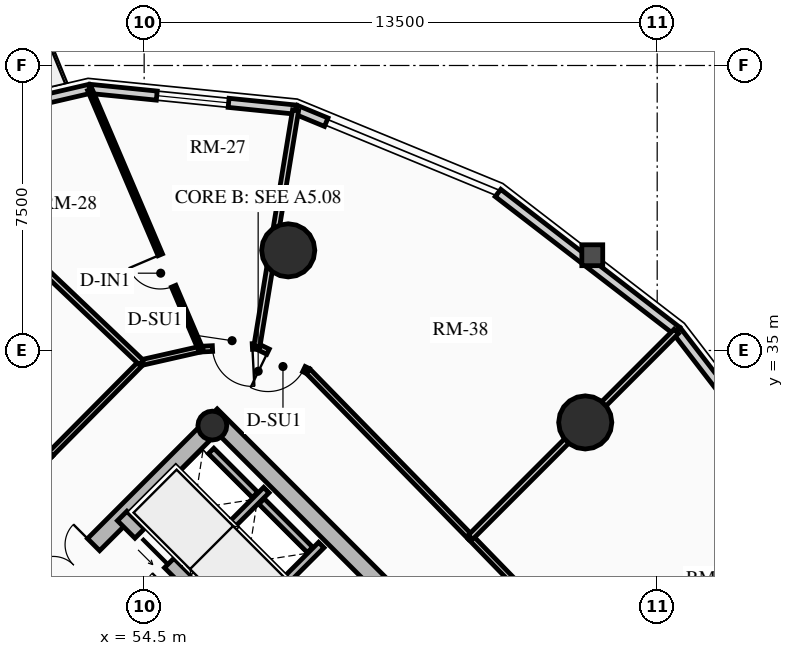
"""IFC4 building model, lengths in metres.
Left out: names, types, materials, properties, quantities, classifications, styles, units other than length and angle.
Written with IfcOpenShell. Run it as: python <this file> out.ifc"""

import sys

from ifc_helpers import new_model, si_unit, direction, frame, frame_2d, origin, origin_2d, place, context, subcontext, project, spatial, rectangle, circle, hollow_circle, extrude, source, transform, mapped, element, fill, save


model = new_model("IFC4")
c1 = context("Model", 3, precision=1e-05, world=origin(), true_north=direction((0.0, 1.0)))
c2 = subcontext(c1, "Body", "Model", "MODEL_VIEW")
j1 = project(units=[si_unit("LENGTHUNIT", "METRE"), si_unit("PLANEANGLEUNIT", "RADIAN")], contexts=[c1])
p1 = place(None, origin())
s1 = spatial("IfcSite", under=j1, at=p1, CompositionType="ELEMENT")
p2 = place(p1, origin())
s2 = spatial("IfcBuilding", under=s1, at=p2, CompositionType="ELEMENT")
p3 = place(p2, frame((0.0, 0.0, 78.88)))
s3 = spatial("IfcBuildingStorey", under=s2, at=p3, CompositionType="ELEMENT", Elevation=78.88)
p4 = place(p3, frame((66.303, 23.263, 0.0), z_axis=(0.0, 0.0, 1.0), x_axis=(-0.707106781187, 0.707106781187, 0.0)))
e1 = element("IfcWall", 1, at=p4, inside=s3, PredefinedType="SHEAR", context=c2, shape_type="SweptSolid", body=[
    extrude(rectangle(XDim=14.2, YDim=0.45, at=frame_2d((7.1, 0.0))), origin(), (0.0, 0.0, 1.0), 2.91),
])
p5 = place(p3, frame((48.856, 25.578, 0.0), z_axis=(0.0, 0.0, 1.0), x_axis=(0.707106781187, 0.707106781187, 0.0)))
e2 = element("IfcWall", 2, at=p5, inside=s3, PredefinedType="SHEAR", context=c2, shape_type="SweptSolid", body=[
    extrude(rectangle(XDim=10.7, YDim=0.45, at=frame_2d((5.35, 0.0))), origin(), (0.0, 0.0, 1.0), 2.91),
])
m1 = source(origin(), c2, "Body", "SweptSolid", [
    extrude(rectangle(XDim=1.5, YDim=2.02, at=frame_2d((0.75, 1.01))), frame((0.0, 0.235, 0.0), z_axis=(0.0, -1.0, 0.0), x_axis=(1.0, 0.0, 0.0)), (0.0, 0.0, 1.0), 0.47),
])
p6 = place(p5, frame((4.6, 0.0, 0.0)))
e3 = element("IfcOpeningElement", 3, at=p6, cuts=e2, PredefinedType="OPENING", context=c2, shape_type="MappedRepresentation", body=[
    mapped(m1, transform((0.0, 0.0, 0.0), x_axis=(1.0, 0.0, 0.0), y_axis=(0.0, 1.0, 0.0), z_axis=(0.0, 0.0, 1.0), scale=1.0)),
])
p7 = place(p3, frame((63.645, 20.922, 0.0), z_axis=(0.0, 0.0, 1.0), x_axis=(-0.707106781187, 0.707106781187, 0.0)))
e4 = element("IfcWall", 4, at=p7, inside=s3, PredefinedType="SHEAR", context=c2, shape_type="SweptSolid", body=[
    extrude(rectangle(XDim=13.75, YDim=0.35, at=frame_2d((6.875, 0.0))), origin(), (0.0, 0.0, 1.0), 2.91),
])
m2 = source(origin(), c2, "Body", "SweptSolid", [
    extrude(rectangle(XDim=1.1, YDim=2.015, at=frame_2d((0.55, 1.007))), frame((0.0, 0.185, 0.0), z_axis=(0.0, -1.0, 0.0), x_axis=(1.0, 0.0, 0.0)), (0.0, 0.0, 1.0), 0.37),
])
p8 = place(p7, frame((10.0, 0.0, 0.0)))
e5 = element("IfcOpeningElement", 5, at=p8, cuts=e4, PredefinedType="OPENING", context=c2, shape_type="MappedRepresentation", body=[
    mapped(m2, transform((0.0, 0.0, 0.0), x_axis=(1.0, 0.0, 0.0), y_axis=(0.0, 1.0, 0.0), z_axis=(0.0, 0.0, 1.0), scale=1.0)),
])
p9 = place(p7, frame((12.0, 0.0, 0.0)))
e6 = element("IfcOpeningElement", 6, at=p9, cuts=e4, PredefinedType="OPENING", context=c2, shape_type="MappedRepresentation", body=[
    mapped(m2, transform((0.0, 0.0, 0.0), x_axis=(1.0, 0.0, 0.0), y_axis=(0.0, 1.0, 0.0), z_axis=(0.0, 0.0, 1.0), scale=1.0)),
])
m3 = source(origin(), c2, "Body", "SweptSolid", [
    extrude(rectangle(XDim=1.15, YDim=2.02, at=frame_2d((0.575, 1.01))), frame((0.0, 0.185, 0.0), z_axis=(0.0, -1.0, 0.0), x_axis=(1.0, 0.0, 0.0)), (0.0, 0.0, 1.0), 0.37),
])
p10 = place(p7, frame((5.305, 0.0, 0.0)))
e7 = element("IfcOpeningElement", 7, at=p10, cuts=e4, PredefinedType="OPENING", context=c2, shape_type="MappedRepresentation", body=[
    mapped(m3, transform((0.0, 0.0, 0.0), x_axis=(1.0, 0.0, 0.0), y_axis=(0.0, 1.0, 0.0), z_axis=(0.0, 0.0, 1.0), scale=1.0)),
])
p11 = place(p3, frame((56.294, 33.024, 0.0), z_axis=(0.0, 0.0, 1.0), x_axis=(0.707106781187, 0.707106781187, 0.0)))
e8 = element("IfcColumn", 8, at=p11, inside=s3, PredefinedType="COLUMN", context=c2, shape_type="SweptSolid", body=[
    extrude(hollow_circle(Radius=0.38, WallThickness=0.032, at=origin_2d()), origin(), (0.0, 0.0, 1.0), 2.91),
])
for number, where, z_axis, x_axis in (
    (9, (66.107, 33.107, 0.0), (0.0, 0.0, 1.0), (1.0, 0.0, 0.0)),
    (10, (58.291, 37.635, 0.0), (0.0, 0.0, 1.0), (1.0, 0.0, 0.0)),
):
    element("IfcColumn", number, at=place(p3, frame(where, z_axis=z_axis, x_axis=x_axis)), inside=s3, PredefinedType="USERDEFINED", context=c2, shape_type="SweptSolid", body=[
        extrude(circle(Radius=0.7, at=origin_2d()), origin(), (0.0, 0.0, 1.0), 2.91),
    ])
p12 = place(p3, frame((63.811, 39.145, 0.0), z_axis=(0.0, 0.0, 1.0), x_axis=(0.791982052206, -0.61054437102, 0.0)))
e11 = element("IfcWall", 11, at=p12, inside=s3, PredefinedType="SOLIDWALL", context=c2, shape_type="SweptSolid", body=[
    extrude(rectangle(XDim=5.942, YDim=0.24, at=frame_2d((2.971, 0.0))), origin(), (0.0, 0.0, 1.0), 2.179),
])
p13 = place(p3, frame((58.487, 41.339, 0.0), z_axis=(0.0, 0.0, 1.0), x_axis=(0.924556017656, -0.381046152345, 0.0)))
e12 = element("IfcWall", 12, at=p13, inside=s3, PredefinedType="SOLIDWALL", context=c2, shape_type="SweptSolid", body=[
    extrude(rectangle(XDim=0.87, YDim=0.24, at=frame_2d((0.435, 0.0))), origin(), (0.0, 0.0, 1.0), 2.179),
])
p14 = place(p3, frame((53.067, 41.885, 0.0), z_axis=(0.0, 0.0, 1.0), x_axis=(0.994971754311, -0.10015591906, 0.0)))
e13 = element("IfcWall", 13, at=p14, inside=s3, PredefinedType="SOLIDWALL", context=c2, shape_type="SweptSolid", body=[
    extrude(rectangle(XDim=5.448, YDim=0.24, at=frame_2d((2.724, 0.0))), origin(), (0.0, 0.0, 1.0), 2.179),
])
m4 = source(origin(), c2, "Body", "SweptSolid", [
    extrude(rectangle(XDim=1.9, YDim=1.35, at=frame_2d((0.95, 0.675))), frame((0.0, 0.13, 0.0), z_axis=(0.0, -1.0, 0.0), x_axis=(1.0, 0.0, 0.0)), (0.0, 0.0, 1.0), 0.26),
])
p15 = place(p14, frame((1.774, 0.0, 0.65)))
e14 = element("IfcOpeningElement", 14, at=p15, cuts=e13, PredefinedType="OPENING", context=c2, shape_type="MappedRepresentation", body=[
    mapped(m4, transform((0.0, 0.0, 0.0), x_axis=(1.0, 0.0, 0.0), y_axis=(0.0, 1.0, 0.0), z_axis=(0.0, 0.0, 1.0), scale=1.0)),
])
p16 = place(p3, frame((48.08, 40.729, 0.0), z_axis=(0.0, 0.0, 1.0), x_axis=(0.974165631126, 0.225834725257, 0.0)))
e15 = element("IfcWall", 15, at=p16, inside=s3, PredefinedType="SOLIDWALL", context=c2, shape_type="SweptSolid", body=[
    extrude(rectangle(XDim=5.119, YDim=0.24, at=frame_2d((2.56, 0.0))), origin(), (0.0, 0.0, 1.0), 2.179),
])
m5 = source(origin(), c2, "Body", "SweptSolid", [
    extrude(rectangle(XDim=1.15, YDim=2.005, at=frame_2d((0.575, 1.002))), frame((0.0, 0.13, 0.0), z_axis=(0.0, -1.0, 0.0), x_axis=(1.0, 0.0, 0.0)), (0.0, 0.0, 1.0), 0.26),
])
p17 = place(p16, frame((1.984, 0.0, 0.0)))
e16 = element("IfcOpeningElement", 16, at=p17, cuts=e15, PredefinedType="OPENING", context=c2, shape_type="MappedRepresentation", body=[
    mapped(m5, transform((0.0, 0.0, 0.0), x_axis=(1.0, 0.0, 0.0), y_axis=(0.0, 1.0, 0.0), z_axis=(0.0, 0.0, 1.0), scale=1.0)),
])
p18 = place(p3, frame((68.517, 35.517, 0.0), z_axis=(0.0, 0.0, 1.0), x_axis=(0.61054437102, -0.791982052206, 0.0)))
e17 = element("IfcWall", 17, at=p18, inside=s3, PredefinedType="SOLIDWALL", context=c2, shape_type="SweptSolid", body=[
    extrude(rectangle(XDim=5.942, YDim=0.24, at=frame_2d((2.971, 0.0))), origin(), (0.0, 0.0, 1.0), 2.179),
])
p19 = place(p18, frame((2.021, 0.0, 0.65)))
e18 = element("IfcOpeningElement", 18, at=p19, cuts=e17, PredefinedType="OPENING", context=c2, shape_type="MappedRepresentation", body=[
    mapped(m4, transform((0.0, 0.0, 0.0), x_axis=(1.0, 0.0, 0.0), y_axis=(0.0, 1.0, 0.0), z_axis=(0.0, 0.0, 1.0), scale=1.0)),
])
p20 = place(p3, frame((57.062, 27.781, 0.0), z_axis=(0.0, 0.0, 1.0), x_axis=(0.707106781187, 0.707106781187, 0.0)))
e19 = element("IfcWall", 19, at=p20, inside=s3, PredefinedType="SHEAR", context=c2, shape_type="SweptSolid", body=[
    extrude(rectangle(XDim=2.97, YDim=0.2, at=frame_2d((1.485, 0.0))), origin(), (0.0, 0.0, 1.0), 2.91),
])
p21 = place(p3, frame((55.615, 29.227, 0.0), z_axis=(0.0, 0.0, 1.0), x_axis=(0.707147878904, 0.70706568108, 0.0)))
e20 = element("IfcWall", 20, at=p21, inside=s3, PredefinedType="SHEAR", context=c2, shape_type="SweptSolid", body=[
    extrude(rectangle(XDim=2.97, YDim=0.2, at=frame_2d((1.485, 0.0))), origin(), (0.0, 0.0, 1.0), 2.91),
])
p22 = place(p3, frame((58.865, 29.754, 0.0), z_axis=(0.0, 0.0, 1.0), x_axis=(-0.707174411312, 0.707039144592, 0.0)))
e21 = element("IfcWall", 21, at=p22, inside=s3, PredefinedType="SHEAR", context=c2, shape_type="SweptSolid", body=[
    extrude(rectangle(XDim=1.805, YDim=0.2, at=frame_2d((0.902, 0.0))), origin(), (0.0, 0.0, 1.0), 2.91),
])
p23 = place(p3, frame((57.419, 31.2, 0.0), z_axis=(0.0, 0.0, 1.0), x_axis=(-0.707032117043, 0.707181437447, 0.0)))
e22 = element("IfcWall", 22, at=p23, inside=s3, PredefinedType="SHEAR", context=c2, shape_type="SweptSolid", body=[
    extrude(rectangle(XDim=1.635, YDim=0.2, at=frame_2d((0.817, 0.0))), origin(), (0.0, 0.0, 1.0), 2.91),
])
p24 = place(p3, frame((63.086, 30.086, 0.0), z_axis=(0.0, 0.0, 1.0), x_axis=(-0.699075897379, 0.715047473741, 0.0)))
e23 = element("IfcWall", 23, at=p24, inside=s3, PredefinedType="PARTITIONING", context=c2, shape_type="SweptSolid", body=[
    extrude(rectangle(XDim=6.114, YDim=0.15, at=frame_2d((3.057, 0.0))), origin(), (0.0, 0.0, 1.0), 2.225),
])
p25 = place(p3, frame((58.812, 34.458, 0.0), z_axis=(0.0, 0.0, 1.0), x_axis=(-0.899559490277, 0.436798264021, 0.0)))
e24 = element("IfcWall", 24, at=p25, inside=s3, PredefinedType="PARTITIONING", context=c2, shape_type="SweptSolid", body=[
    extrude(rectangle(XDim=1.495, YDim=0.15, at=frame_2d((0.748, 0.0))), origin(), (0.0, 0.0, 1.0), 2.225),
])
m6 = source(origin(), c2, "Body", "SweptSolid", [
    extrude(rectangle(XDim=1.05, YDim=2.015, at=frame_2d((0.525, 1.007))), frame((0.0, 0.085, 0.0), z_axis=(0.0, -1.0, 0.0), x_axis=(1.0, 0.0, 0.0)), (0.0, 0.0, 1.0), 0.17),
])
p26 = place(p25, frame((0.12, 0.0, 0.0)))
e25 = element("IfcOpeningElement", 25, at=p26, cuts=e24, PredefinedType="OPENING", context=c2, shape_type="MappedRepresentation", body=[
    mapped(m6, transform((0.0, 0.0, 0.0), x_axis=(1.0, 0.0, 0.0), y_axis=(0.0, 1.0, 0.0), z_axis=(0.0, 0.0, 1.0), scale=1.0)),
])
p27 = place(p3, frame((57.467, 35.111, 0.0), z_axis=(0.0, 0.0, 1.0), x_axis=(-0.998691757323, -0.051134859488, 0.0)))
e26 = element("IfcWall", 26, at=p27, inside=s3, PredefinedType="PARTITIONING", context=c2, shape_type="SweptSolid", body=[
    extrude(rectangle(XDim=1.485, YDim=0.15, at=frame_2d((0.742, 0.0))), origin(), (0.0, 0.0, 1.0), 2.225),
])
p28 = place(p27, frame((0.12, 0.0, 0.0)))
e27 = element("IfcOpeningElement", 27, at=p28, cuts=e26, PredefinedType="OPENING", context=c2, shape_type="MappedRepresentation", body=[
    mapped(m6, transform((0.0, 0.0, 0.0), x_axis=(1.0, 0.0, 0.0), y_axis=(0.0, 1.0, 0.0), z_axis=(0.0, 0.0, 1.0), scale=1.0)),
])
p29 = place(p3, frame((55.984, 35.035, 0.0), z_axis=(0.0, 0.0, 1.0), x_axis=(-0.975290305708, -0.22092718165, 0.0)))
e28 = element("IfcWall", 28, at=p29, inside=s3, PredefinedType="PARTITIONING", context=c2, shape_type="SweptSolid", body=[
    extrude(rectangle(XDim=1.597, YDim=0.15, at=frame_2d((0.798, 0.0))), origin(), (0.0, 0.0, 1.0), 2.225),
])
p30 = place(p3, frame((54.427, 34.683, 0.0), z_axis=(0.0, 0.0, 1.0), x_axis=(-0.704178989986, -0.710022499687, 0.0)))
e29 = element("IfcWall", 29, at=p30, inside=s3, PredefinedType="PARTITIONING", context=c2, shape_type="SweptSolid", body=[
    extrude(rectangle(XDim=3.384, YDim=0.15, at=frame_2d((1.692, 0.0))), origin(), (0.0, 0.0, 1.0), 2.225),
])
p31 = place(p3, frame((52.043, 32.28, 0.0), z_axis=(0.0, 0.0, 1.0), x_axis=(-0.682606081633, -0.730786519661, 0.0)))
e30 = element("IfcWall", 30, at=p31, inside=s3, PredefinedType="PARTITIONING", context=c2, shape_type="SweptSolid", body=[
    extrude(rectangle(XDim=6.527, YDim=0.15, at=frame_2d((3.263, 0.0))), origin(), (0.0, 0.0, 1.0), 2.225),
])
p32 = place(p31, frame((2.738, 0.0, 0.0)))
e31 = element("IfcOpeningElement", 31, at=p32, cuts=e30, PredefinedType="OPENING", context=c2, shape_type="MappedRepresentation", body=[
    mapped(m6, transform((0.0, 0.0, 0.0), x_axis=(1.0, 0.0, 0.0), y_axis=(0.0, 1.0, 0.0), z_axis=(0.0, 0.0, 1.0), scale=1.0)),
])
p33 = place(p3, frame((67.27, 25.78, 0.0), z_axis=(0.0, 0.0, 1.0), x_axis=(-0.696847842907, 0.717218992942, 0.0)))
e32 = element("IfcWall", 32, at=p33, inside=s3, PredefinedType="PARTITIONING", context=c2, shape_type="SweptSolid", body=[
    extrude(rectangle(XDim=6.004, YDim=0.15, at=frame_2d((3.002, 0.0))), origin(), (0.0, 0.0, 1.0), 2.655),
])
m7 = source(origin(), c2, "Body", "SweptSolid", [
    extrude(rectangle(XDim=1.0, YDim=2.015, at=frame_2d((0.5, 1.007))), frame((0.0, 0.085, 0.0), z_axis=(0.0, -1.0, 0.0), x_axis=(1.0, 0.0, 0.0)), (0.0, 0.0, 1.0), 0.17),
])
p34 = place(p33, frame((2.502, 0.0, 0.0)))
e33 = element("IfcOpeningElement", 33, at=p34, cuts=e32, PredefinedType="OPENING", context=c2, shape_type="MappedRepresentation", body=[
    mapped(m7, transform((0.0, 0.0, 0.0), x_axis=(1.0, 0.0, 0.0), y_axis=(0.0, 1.0, 0.0), z_axis=(0.0, 0.0, 1.0), scale=1.0)),
])
p35 = place(p3, frame((63.086, 30.086, 0.0), z_axis=(0.0, 0.0, 1.0), x_axis=(0.707106781187, 0.707106781187, 0.0)))
e34 = element("IfcWall", 34, at=p35, inside=s3, PredefinedType="PARTITIONING", context=c2, shape_type="SweptSolid", body=[
    extrude(rectangle(XDim=7.661, YDim=0.16, at=frame_2d((3.831, 0.0))), origin(), (0.0, 0.0, 1.0), 2.179),
])
p36 = place(p3, frame((57.467, 35.111, 0.0), z_axis=(0.0, 0.0, 1.0), x_axis=(0.161711214096, 0.98683812413, 0.0)))
e35 = element("IfcWall", 35, at=p36, inside=s3, PredefinedType="PARTITIONING", context=c2, shape_type="SweptSolid", body=[
    extrude(rectangle(XDim=6.291, YDim=0.16, at=frame_2d((3.146, 0.0))), origin(), (0.0, 0.0, 1.0), 2.179),
])
p37 = place(p3, frame((54.427, 34.683, 0.0), z_axis=(0.0, 0.0, 1.0), x_axis=(-0.72454072322, 0.689231993161, 0.0)))
e36 = element("IfcWall", 36, at=p37, inside=s3, PredefinedType="PARTITIONING", context=c2, shape_type="SweptSolid", body=[
    extrude(rectangle(XDim=8.747, YDim=0.16, at=frame_2d((4.374, 0.0))), origin(), (0.0, 0.0, 1.0), 2.179),
])
p38 = place(p3, frame((55.984, 35.035, 0.0), z_axis=(0.0, 0.0, 1.0), x_axis=(-0.392438685048, 0.919778168081, 0.0)))
e37 = element("IfcWall", 37, at=p38, inside=s3, PredefinedType="PARTITIONING", context=c2, shape_type="SweptSolid", body=[
    extrude(rectangle(XDim=7.426, YDim=0.125, at=frame_2d((3.713, 0.0))), origin(), (0.0, 0.0, 1.0), 2.179),
])
m8 = source(origin(), c2, "Body", "SweptSolid", [
    extrude(rectangle(XDim=0.9, YDim=2.005, at=frame_2d((0.45, 1.002))), frame((0.0, 0.073, 0.0), z_axis=(0.0, -1.0, 0.0), x_axis=(1.0, 0.0, 0.0)), (0.0, 0.0, 1.0), 0.145),
])
p39 = place(p38, frame((1.8, 0.0, 0.0)))
e38 = element("IfcOpeningElement", 38, at=p39, cuts=e37, PredefinedType="OPENING", context=c2, shape_type="MappedRepresentation", body=[
    mapped(m8, transform((0.0, 0.0, 0.0), x_axis=(1.0, 0.0, 0.0), y_axis=(0.0, 1.0, 0.0), z_axis=(0.0, 0.0, 1.0), scale=1.0)),
])
m9 = source(origin(), c2, "Body", "SweptSolid", [
    extrude(rectangle(XDim=1.9, YDim=1.35, at=frame_2d((0.95, 0.675))), frame((0.0, 0.03, 0.0), z_axis=(0.0, -1.0, 0.0), x_axis=(1.0, 0.0, 0.0)), (0.0, 0.0, 1.0), 0.06),
])
p40 = place(p15, origin())
e39 = element("IfcWindow", 39, at=p40, inside=s3, PartitioningType="DOUBLE_PANEL_VERTICAL", PredefinedType="WINDOW", context=c2, shape_type="MappedRepresentation", body=[
    mapped(m9, transform((0.0, 0.0, 0.0), x_axis=(1.0, 0.0, 0.0), y_axis=(0.0, 1.0, 0.0), z_axis=(0.0, 0.0, 1.0), scale=1.0)),
])
fill(e14, e39)
m10 = source(origin(), c2, "Body", "SweptSolid", [
    extrude(rectangle(XDim=1.1, YDim=2.015, at=frame_2d((0.55, 1.007))), frame((0.0, 0.025, 0.0), z_axis=(0.0, -1.0, 0.0), x_axis=(1.0, 0.0, 0.0)), (0.0, 0.0, 1.0), 0.05),
])
p41 = place(p9, origin())
e40 = element("IfcDoor", 40, at=p41, inside=s3, OperationType="SLIDING_TO_LEFT", PredefinedType="DOOR", context=c2, shape_type="MappedRepresentation", body=[
    mapped(m10, transform((0.0, 0.0, 0.0), x_axis=(1.0, 0.0, 0.0), y_axis=(0.0, 1.0, 0.0), z_axis=(0.0, 0.0, 1.0), scale=1.0)),
])
fill(e6, e40)
m11 = source(origin(), c2, "Body", "SweptSolid", [
    extrude(rectangle(XDim=1.5, YDim=2.02, at=frame_2d((0.75, 1.01))), frame((0.0, 0.025, 0.0), z_axis=(0.0, -1.0, 0.0), x_axis=(1.0, 0.0, 0.0)), (0.0, 0.0, 1.0), 0.05),
])
p42 = place(p6, origin())
e41 = element("IfcDoor", 41, at=p42, inside=s3, OperationType="DOUBLE_DOOR_SINGLE_SWING", PredefinedType="DOOR", context=c2, shape_type="MappedRepresentation", body=[
    mapped(m11, transform((0.0, 0.0, 0.0), x_axis=(1.0, 0.0, 0.0), y_axis=(0.0, 1.0, 0.0), z_axis=(0.0, 0.0, 1.0), scale=1.0)),
])
fill(e3, e41)
m12 = source(origin(), c2, "Body", "SweptSolid", [
    extrude(rectangle(XDim=1.05, YDim=2.015, at=frame_2d((0.525, 1.007))), frame((0.0, 0.025, 0.0), z_axis=(0.0, -1.0, 0.0), x_axis=(1.0, 0.0, 0.0)), (0.0, 0.0, 1.0), 0.05),
])
p43 = place(p28, origin())
e42 = element("IfcDoor", 42, at=p43, inside=s3, OperationType="SINGLE_SWING_LEFT", PredefinedType="DOOR", context=c2, shape_type="MappedRepresentation", body=[
    mapped(m12, transform((0.0, 0.0, 0.0), x_axis=(1.0, 0.0, 0.0), y_axis=(0.0, 1.0, 0.0), z_axis=(0.0, 0.0, 1.0), scale=1.0)),
])
fill(e27, e42)
m13 = source(origin(), c2, "Body", "SweptSolid", [
    extrude(rectangle(XDim=0.9, YDim=2.005, at=frame_2d((0.45, 1.002))), frame((0.0, 0.025, 0.0), z_axis=(0.0, -1.0, 0.0), x_axis=(1.0, 0.0, 0.0)), (0.0, 0.0, 1.0), 0.05),
])
p44 = place(p39, origin())
e43 = element("IfcDoor", 43, at=p44, inside=s3, OperationType="SINGLE_SWING_RIGHT", PredefinedType="DOOR", context=c2, shape_type="MappedRepresentation", body=[
    mapped(m13, transform((0.0, 0.0, 0.0), x_axis=(1.0, 0.0, 0.0), y_axis=(0.0, 1.0, 0.0), z_axis=(0.0, 0.0, 1.0), scale=1.0)),
])
fill(e38, e43)
p45 = place(p26, origin())
e44 = element("IfcDoor", 44, at=p45, inside=s3, OperationType="SINGLE_SWING_RIGHT", PredefinedType="DOOR", context=c2, shape_type="MappedRepresentation", body=[
    mapped(m12, transform((0.0, 0.0, 0.0), x_axis=(1.0, 0.0, 0.0), y_axis=(0.0, 1.0, 0.0), z_axis=(0.0, 0.0, 1.0), scale=1.0)),
])
fill(e25, e44)
save(model, sys.argv[1])
